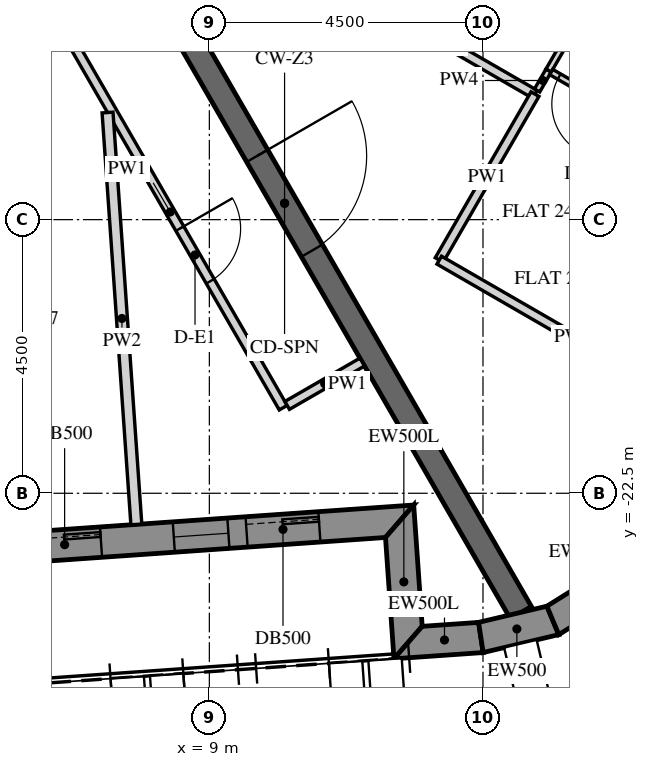
"""IFC4 building model, lengths in metres.
Left out: names, types, materials, properties, quantities, classifications, styles, units other than length and angle.
Written with IfcOpenShell. Run it as: python <this file> out.ifc"""

import sys

from ifc_helpers import new_model, si_unit, direction, frame, frame_2d, origin, place, context, subcontext, project, spatial, polyline, rectangle, outline, extrude, element, fill, save


model = new_model("IFC4")
c1 = context("Model", 3, precision=1e-05, world=origin(), true_north=direction((0.0, 1.0)))
c2 = subcontext(c1, "Body", "Model", "MODEL_VIEW")
j1 = project(units=[si_unit("LENGTHUNIT", "METRE"), si_unit("PLANEANGLEUNIT", "RADIAN")], contexts=[c1])
p1 = place(None, origin())
s1 = spatial("IfcSite", under=j1, at=p1, CompositionType="ELEMENT")
p2 = place(p1, origin())
s2 = spatial("IfcBuilding", under=s1, at=p2, CompositionType="ELEMENT")
p3 = place(p2, frame((0.0, 0.0, 303.0)))
s3 = spatial("IfcBuildingStorey", under=s2, at=p3, CompositionType="ELEMENT", Elevation=303.0)
p4 = place(p3, frame((-10.86, -24.567, -0.15), z_axis=(0.0, 0.0, 1.0), x_axis=(0.997564329317, 0.06975248292, 0.0)))
e1 = element("IfcWall", 1, at=p4, inside=s3, PredefinedType="SOLIDWALL", context=c2, shape_type="SweptSolid", body=[
    extrude(outline(polyline([(0.25, -0.25), (22.795, -0.25), (23.295, 0.25), (-0.25, 0.25), (0.25, -0.25)])), origin(), (0.0, 0.0, 1.0), 3.9),
])
p5 = place(p4, frame((1.323, 0.0, 1.05)))
e2 = element("IfcOpeningElement", 2, at=p5, cuts=e1, PredefinedType="OPENING", context=c2, shape_type="SweptSolid", body=[
    extrude(rectangle(XDim=0.9, YDim=1.5, at=frame_2d((0.45, 0.75))), frame((0.0, 0.26, 0.0), z_axis=(0.0, -1.0, 0.0), x_axis=(1.0, 0.0, 0.0)), (0.0, 0.0, 1.0), 0.52),
])
p6 = place(p4, frame((2.522, 0.0, 0.15)))
e3 = element("IfcOpeningElement", 3, at=p6, cuts=e1, PredefinedType="OPENING", context=c2, shape_type="SweptSolid", body=[
    extrude(rectangle(XDim=1.2, YDim=2.4, at=frame_2d((0.6, 1.2))), frame((0.0, 0.26, 0.0), z_axis=(0.0, -1.0, 0.0), x_axis=(1.0, 0.0, 0.0)), (0.0, 0.0, 1.0), 0.52),
])
p7 = place(p4, frame((4.922, 0.0, 1.05)))
e4 = element("IfcOpeningElement", 4, at=p7, cuts=e1, PredefinedType="OPENING", context=c2, shape_type="SweptSolid", body=[
    extrude(rectangle(XDim=0.9, YDim=1.5, at=frame_2d((0.45, 0.75))), frame((0.0, 0.26, 0.0), z_axis=(0.0, -1.0, 0.0), x_axis=(1.0, 0.0, 0.0)), (0.0, 0.0, 1.0), 0.52),
])
p8 = place(p4, frame((6.122, 0.0, 0.15)))
e5 = element("IfcOpeningElement", 5, at=p8, cuts=e1, PredefinedType="OPENING", context=c2, shape_type="SweptSolid", body=[
    extrude(rectangle(XDim=1.2, YDim=2.4, at=frame_2d((0.6, 1.2))), frame((0.0, 0.26, 0.0), z_axis=(0.0, -1.0, 0.0), x_axis=(1.0, 0.0, 0.0)), (0.0, 0.0, 1.0), 0.52),
])
p9 = place(p4, frame((8.522, 0.0, 1.05)))
e6 = element("IfcOpeningElement", 6, at=p9, cuts=e1, PredefinedType="OPENING", context=c2, shape_type="SweptSolid", body=[
    extrude(rectangle(XDim=0.9, YDim=1.5, at=frame_2d((0.45, 0.75))), frame((0.0, 0.26, 0.0), z_axis=(0.0, -1.0, 0.0), x_axis=(1.0, 0.0, 0.0)), (0.0, 0.0, 1.0), 0.52),
])
p10 = place(p4, frame((9.722, 0.0, 0.15)))
e7 = element("IfcOpeningElement", 7, at=p10, cuts=e1, PredefinedType="OPENING", context=c2, shape_type="SweptSolid", body=[
    extrude(rectangle(XDim=1.2, YDim=2.4, at=frame_2d((0.6, 1.2))), frame((0.0, 0.26, 0.0), z_axis=(0.0, -1.0, 0.0), x_axis=(1.0, 0.0, 0.0)), (0.0, 0.0, 1.0), 0.52),
])
p11 = place(p4, frame((12.122, 0.0, 1.05)))
e8 = element("IfcOpeningElement", 8, at=p11, cuts=e1, PredefinedType="OPENING", context=c2, shape_type="SweptSolid", body=[
    extrude(rectangle(XDim=0.9, YDim=1.5, at=frame_2d((0.45, 0.75))), frame((0.0, 0.26, 0.0), z_axis=(0.0, -1.0, 0.0), x_axis=(1.0, 0.0, 0.0)), (0.0, 0.0, 1.0), 0.52),
])
p12 = place(p4, frame((13.323, 0.0, 0.15)))
e9 = element("IfcOpeningElement", 9, at=p12, cuts=e1, PredefinedType="OPENING", context=c2, shape_type="SweptSolid", body=[
    extrude(rectangle(XDim=1.2, YDim=2.4, at=frame_2d((0.6, 1.2))), frame((0.0, 0.26, 0.0), z_axis=(0.0, -1.0, 0.0), x_axis=(1.0, 0.0, 0.0)), (0.0, 0.0, 1.0), 0.52),
])
p13 = place(p4, frame((15.722, 0.0, 1.05)))
e10 = element("IfcOpeningElement", 10, at=p13, cuts=e1, PredefinedType="OPENING", context=c2, shape_type="SweptSolid", body=[
    extrude(rectangle(XDim=0.9, YDim=1.5, at=frame_2d((0.45, 0.75))), frame((0.0, 0.26, 0.0), z_axis=(0.0, -1.0, 0.0), x_axis=(1.0, 0.0, 0.0)), (0.0, 0.0, 1.0), 0.52),
])
p14 = place(p4, frame((16.922, 0.0, 0.15)))
e11 = element("IfcOpeningElement", 11, at=p14, cuts=e1, PredefinedType="OPENING", context=c2, shape_type="SweptSolid", body=[
    extrude(rectangle(XDim=1.2, YDim=2.4, at=frame_2d((0.6, 1.2))), frame((0.0, 0.26, 0.0), z_axis=(0.0, -1.0, 0.0), x_axis=(1.0, 0.0, 0.0)), (0.0, 0.0, 1.0), 0.52),
])
p15 = place(p4, frame((19.323, 0.0, 1.05)))
e12 = element("IfcOpeningElement", 12, at=p15, cuts=e1, PredefinedType="OPENING", context=c2, shape_type="SweptSolid", body=[
    extrude(rectangle(XDim=0.9, YDim=1.5, at=frame_2d((0.45, 0.75))), frame((0.0, 0.26, 0.0), z_axis=(0.0, -1.0, 0.0), x_axis=(1.0, 0.0, 0.0)), (0.0, 0.0, 1.0), 0.52),
])
p16 = place(p4, frame((20.522, 0.0, 0.15)))
e13 = element("IfcOpeningElement", 13, at=p16, cuts=e1, PredefinedType="OPENING", context=c2, shape_type="SweptSolid", body=[
    extrude(rectangle(XDim=1.2, YDim=2.4, at=frame_2d((0.6, 1.2))), frame((0.0, 0.26, 0.0), z_axis=(0.0, -1.0, 0.0), x_axis=(1.0, 0.0, 0.0)), (0.0, 0.0, 1.0), 0.52),
])
p17 = place(p3, frame((12.129, -22.96, -0.15), z_axis=(0.0, 0.0, 1.0), x_axis=(0.069824268692, -0.99755930726, 0.0)))
e14 = element("IfcWall", 14, at=p17, inside=s3, PredefinedType="SOLIDWALL", context=c2, shape_type="SweptSolid", body=[
    extrude(outline(polyline([(0.25, -0.25), (2.25, -0.25), (1.75, 0.25), (-0.25, 0.25), (0.25, -0.25)])), origin(), (0.0, 0.0, 1.0), 3.9),
])
p18 = place(p3, frame((12.268, -24.955, -0.15), z_axis=(0.0, 0.0, 1.0), x_axis=(0.997561942506, 0.06978660948, 0.0)))
e15 = element("IfcWall", 15, at=p18, inside=s3, PredefinedType="SOLIDWALL", context=c2, shape_type="SweptSolid", body=[
    extrude(outline(polyline([(-0.25, -0.25), (1.22, -0.25), (1.179, 0.25), (0.25, 0.25), (-0.25, -0.25)])), origin(), (0.0, 0.0, 1.0), 3.9),
])
p19 = place(p3, frame((13.465, -24.871, -0.15), z_axis=(0.0, 0.0, 1.0), x_axis=(0.973044740285, 0.230616420501, 0.0)))
e16 = element("IfcWall", 16, at=p19, inside=s3, PredefinedType="SOLIDWALL", context=c2, shape_type="SweptSolid", body=[
    extrude(outline(polyline([(-0.021, -0.25), (1.257, -0.25), (1.175, 0.25), (0.021, 0.25), (-0.021, -0.25)])), origin(), (0.0, 0.0, 1.0), 3.9),
])
p20 = place(p3, frame((14.649, -24.591, -0.15), z_axis=(0.0, 0.0, 1.0), x_axis=(0.848054682072, 0.529908724419, 0.0)))
e17 = element("IfcWall", 17, at=p20, inside=s3, PredefinedType="SOLIDWALL", context=c2, shape_type="SweptSolid", body=[
    extrude(outline(polyline([(-0.041, -0.25), (1.257, -0.25), (1.175, 0.25), (0.041, 0.25), (-0.041, -0.25)])), origin(), (0.0, 0.0, 1.0), 3.9),
])
p21 = place(p3, frame((6.351, -11.0, -0.15), z_axis=(0.0, 0.0, 1.0), x_axis=(0.499998894578, -0.866026041999, 0.0)))
e18 = element("IfcWall", 18, at=p21, inside=s3, PredefinedType="SHEAR", context=c2, shape_type="SweptSolid", body=[
    extrude(rectangle(XDim=15.544, YDim=0.4, at=frame_2d((7.772, 0.0))), origin(), (0.0, 0.0, 1.0), 3.9),
])
p22 = place(p21, frame((6.872, 0.0, 0.15)))
e19 = element("IfcOpeningElement", 19, at=p22, cuts=e18, PredefinedType="OPENING", context=c2, shape_type="SweptSolid", body=[
    extrude(rectangle(XDim=1.8, YDim=2.4, at=frame_2d((0.9, 1.2))), frame((0.0, 0.21, 0.0), z_axis=(0.0, -1.0, 0.0), x_axis=(1.0, 0.0, 0.0)), (0.0, 0.0, 1.0), 0.42),
])
p23 = place(p3, frame((-10.44, -15.767, 0.0), z_axis=(0.0, 0.0, 1.0), x_axis=(0.997565037323, 0.069742356651, 0.0)))
e20 = element("IfcWall", 20, at=p23, inside=s3, PredefinedType="PARTITIONING", context=c2, shape_type="SweptSolid", body=[
    extrude(rectangle(XDim=16.939, YDim=0.15, at=frame_2d((8.47, 0.0))), origin(), (0.0, 0.0, 1.0), 2.988),
])
p24 = place(p23, frame((6.09, 0.0, 0.0)))
e21 = element("IfcOpeningElement", 21, at=p24, cuts=e20, PredefinedType="OPENING", context=c2, shape_type="SweptSolid", body=[
    extrude(rectangle(XDim=1.0, YDim=2.1, at=frame_2d((0.5, 1.05))), frame((0.0, 0.085, 0.0), z_axis=(0.0, -1.0, 0.0), x_axis=(1.0, 0.0, 0.0)), (0.0, 0.0, 1.0), 0.17),
])
p25 = place(p23, frame((15.39, 0.0, 0.0)))
e22 = element("IfcOpeningElement", 22, at=p25, cuts=e20, PredefinedType="OPENING", context=c2, shape_type="SweptSolid", body=[
    extrude(rectangle(XDim=1.0, YDim=2.1, at=frame_2d((0.5, 1.05))), frame((0.0, 0.085, 0.0), z_axis=(0.0, -1.0, 0.0), x_axis=(1.0, 0.0, 0.0)), (0.0, 0.0, 1.0), 0.17),
])
p26 = place(p3, frame((6.5, -14.657, 0.0), z_axis=(0.0, 0.0, 1.0), x_axis=(0.499966098742, -0.8660449758, 0.0)))
e23 = element("IfcWall", 23, at=p26, inside=s3, PredefinedType="PARTITIONING", context=c2, shape_type="SweptSolid", body=[
    extrude(rectangle(XDim=7.431, YDim=0.15, at=frame_2d((3.715, 0.0))), origin(), (0.0, 0.0, 1.0), 2.988),
])
p27 = place(p26, frame((4.03, 0.0, 0.0)))
e24 = element("IfcOpeningElement", 24, at=p27, cuts=e23, PredefinedType="OPENING", context=c2, shape_type="SweptSolid", body=[
    extrude(rectangle(XDim=1.0, YDim=2.1, at=frame_2d((0.5, 1.05))), frame((0.0, 0.085, 0.0), z_axis=(0.0, -1.0, 0.0), x_axis=(1.0, 0.0, 0.0)), (0.0, 0.0, 1.0), 0.17),
])
p28 = place(p3, frame((10.28, -21.055, 0.0), z_axis=(0.0, 0.0, 1.0), x_axis=(0.866020080793, 0.500009219579, 0.0)))
e25 = element("IfcWall", 25, at=p28, inside=s3, PredefinedType="PARTITIONING", context=c2, shape_type="SweptSolid", body=[
    extrude(rectangle(XDim=1.425, YDim=0.15, at=frame_2d((0.712, 0.0))), origin(), (0.0, 0.0, 1.0), 2.988),
])
p29 = place(p3, frame((14.354, -15.939, 0.0), z_axis=(0.0, 0.0, 1.0), x_axis=(-0.866020560687, 0.500008388397, 0.0)))
e26 = element("IfcWall", 26, at=p29, inside=s3, PredefinedType="PARTITIONING", context=c2, shape_type="SweptSolid", body=[
    extrude(rectangle(XDim=3.4, YDim=0.15, at=frame_2d((1.7, 0.0))), origin(), (0.0, 0.0, 1.0), 2.988),
])
p30 = place(p3, frame((12.78, -18.665, 0.0), z_axis=(0.0, 0.0, 1.0), x_axis=(0.499972881236, 0.866041060244, 0.0)))
e27 = element("IfcWall", 27, at=p30, inside=s3, PredefinedType="PARTITIONING", context=c2, shape_type="SweptSolid", body=[
    extrude(rectangle(XDim=3.151, YDim=0.15, at=frame_2d((1.575, 0.0))), origin(), (0.0, 0.0, 1.0), 2.988),
])
p31 = place(p3, frame((17.196, -21.216, 0.0), z_axis=(0.0, 0.0, 1.0), x_axis=(-0.866024511559, 0.500001545377, 0.0)))
e28 = element("IfcWall", 28, at=p31, inside=s3, PredefinedType="PARTITIONING", context=c2, shape_type="SweptSolid", body=[
    extrude(rectangle(XDim=5.099, YDim=0.15, at=frame_2d((2.549, 0.0))), origin(), (0.0, 0.0, 1.0), 2.988),
])
p32 = place(p3, frame((7.8, -23.012, 0.0), z_axis=(0.0, 0.0, 1.0), x_axis=(-0.069757205717, 0.997563999075, 0.0)))
e29 = element("IfcWall", 29, at=p32, inside=s3, PredefinedType="PARTITIONING", context=c2, shape_type="SweptSolid", body=[
    extrude(rectangle(XDim=6.79, YDim=0.18, at=frame_2d((3.395, 0.0))), origin(), (0.0, 0.0, 1.0), 2.988),
])
p33 = place(p3, frame((14.39, -15.875, 0.0), z_axis=(0.0, 0.0, 1.0), x_axis=(0.500094824054, 0.865970650169, 0.0)))
e30 = element("IfcWall", 30, at=p33, inside=s3, PredefinedType="PARTITIONING", context=c2, shape_type="SweptSolid", body=[
    extrude(rectangle(XDim=0.378, YDim=0.1, at=frame_2d((0.189, 0.0))), origin(), (0.0, 0.0, 1.0), 2.988),
])
p34 = place(p3, frame((14.579, -15.548, 0.0), z_axis=(0.0, 0.0, 1.0), x_axis=(0.499949632511, 0.866054481515, 0.0)))
e31 = element("IfcWall", 31, at=p34, inside=s3, PredefinedType="PARTITIONING", context=c2, shape_type="SweptSolid", body=[
    extrude(rectangle(XDim=1.551, YDim=0.1, at=frame_2d((0.775, 0.0))), origin(), (0.0, 0.0, 1.0), 2.988),
])
p35 = place(p3, frame((18.996, -18.098, 0.0), z_axis=(0.0, 0.0, 1.0), x_axis=(-0.866039067339, 0.499976333282, 0.0)))
e32 = element("IfcWall", 32, at=p35, inside=s3, PredefinedType="PARTITIONING", context=c2, shape_type="SweptSolid", body=[
    extrude(rectangle(XDim=5.05, YDim=0.1, at=frame_2d((2.525, 0.0))), origin(), (0.0, 0.0, 1.0), 2.988),
])
p36 = place(p35, frame((4.0, 0.0, 0.0)))
e33 = element("IfcOpeningElement", 33, at=p36, cuts=e32, PredefinedType="OPENING", context=c2, shape_type="SweptSolid", body=[
    extrude(rectangle(XDim=0.9, YDim=2.1, at=frame_2d((0.45, 1.05))), frame((0.0, 0.06, 0.0), z_axis=(0.0, -1.0, 0.0), x_axis=(1.0, 0.0, 0.0)), (0.0, 0.0, 1.0), 0.12),
])
p37 = place(p14, frame((0.0, 0.175, 0.0)))
e34 = element("IfcDoor", 34, at=p37, inside=s3, OperationType="SLIDING_TO_LEFT", PredefinedType="DOOR", context=c2, shape_type="SweptSolid", body=[
    extrude(rectangle(XDim=1.2, YDim=2.4, at=frame_2d((0.6, 1.2))), frame((0.0, 0.025, 0.0), z_axis=(0.0, -1.0, 0.0), x_axis=(1.0, 0.0, 0.0)), (0.0, 0.0, 1.0), 0.05),
])
fill(e11, e34)
p38 = place(p15, frame((0.0, 0.18, 0.0)))
e35 = element("IfcWindow", 35, at=p38, inside=s3, PartitioningType="SINGLE_PANEL", PredefinedType="WINDOW", context=c2, shape_type="SweptSolid", body=[
    extrude(rectangle(XDim=0.9, YDim=1.5, at=frame_2d((0.45, 0.75))), frame((0.0, 0.03, 0.0), z_axis=(0.0, -1.0, 0.0), x_axis=(1.0, 0.0, 0.0)), (0.0, 0.0, 1.0), 0.06),
])
fill(e12, e35)
p39 = place(p16, frame((0.0, 0.175, 0.0)))
e36 = element("IfcDoor", 36, at=p39, inside=s3, OperationType="SLIDING_TO_LEFT", PredefinedType="DOOR", context=c2, shape_type="SweptSolid", body=[
    extrude(rectangle(XDim=1.2, YDim=2.4, at=frame_2d((0.6, 1.2))), frame((0.0, 0.025, 0.0), z_axis=(0.0, -1.0, 0.0), x_axis=(1.0, 0.0, 0.0)), (0.0, 0.0, 1.0), 0.05),
])
fill(e13, e36)
p40 = place(p22, origin())
e37 = element("IfcDoor", 37, at=p40, inside=s3, OperationType="DOUBLE_DOOR_SINGLE_SWING", PredefinedType="DOOR", context=c2, shape_type="SweptSolid", body=[
    extrude(rectangle(XDim=1.8, YDim=2.4, at=frame_2d((0.9, 1.2))), frame((0.0, 0.025, 0.0), z_axis=(0.0, -1.0, 0.0), x_axis=(1.0, 0.0, 0.0)), (0.0, 0.0, 1.0), 0.05),
])
fill(e19, e37)
p41 = place(p27, origin())
e38 = element("IfcDoor", 38, at=p41, inside=s3, OperationType="SINGLE_SWING_RIGHT", PredefinedType="DOOR", context=c2, shape_type="SweptSolid", body=[
    extrude(rectangle(XDim=1.0, YDim=2.1, at=frame_2d((0.5, 1.05))), frame((0.0, 0.025, 0.0), z_axis=(0.0, -1.0, 0.0), x_axis=(1.0, 0.0, 0.0)), (0.0, 0.0, 1.0), 0.05),
])
fill(e24, e38)
p42 = place(p36, origin())
e39 = element("IfcDoor", 39, at=p42, inside=s3, OperationType="SINGLE_SWING_RIGHT", PredefinedType="DOOR", context=c2, shape_type="SweptSolid", body=[
    extrude(rectangle(XDim=0.9, YDim=2.1, at=frame_2d((0.45, 1.05))), frame((0.0, 0.025, 0.0), z_axis=(0.0, -1.0, 0.0), x_axis=(1.0, 0.0, 0.0)), (0.0, 0.0, 1.0), 0.05),
])
fill(e33, e39)
save(model, sys.argv[1])
